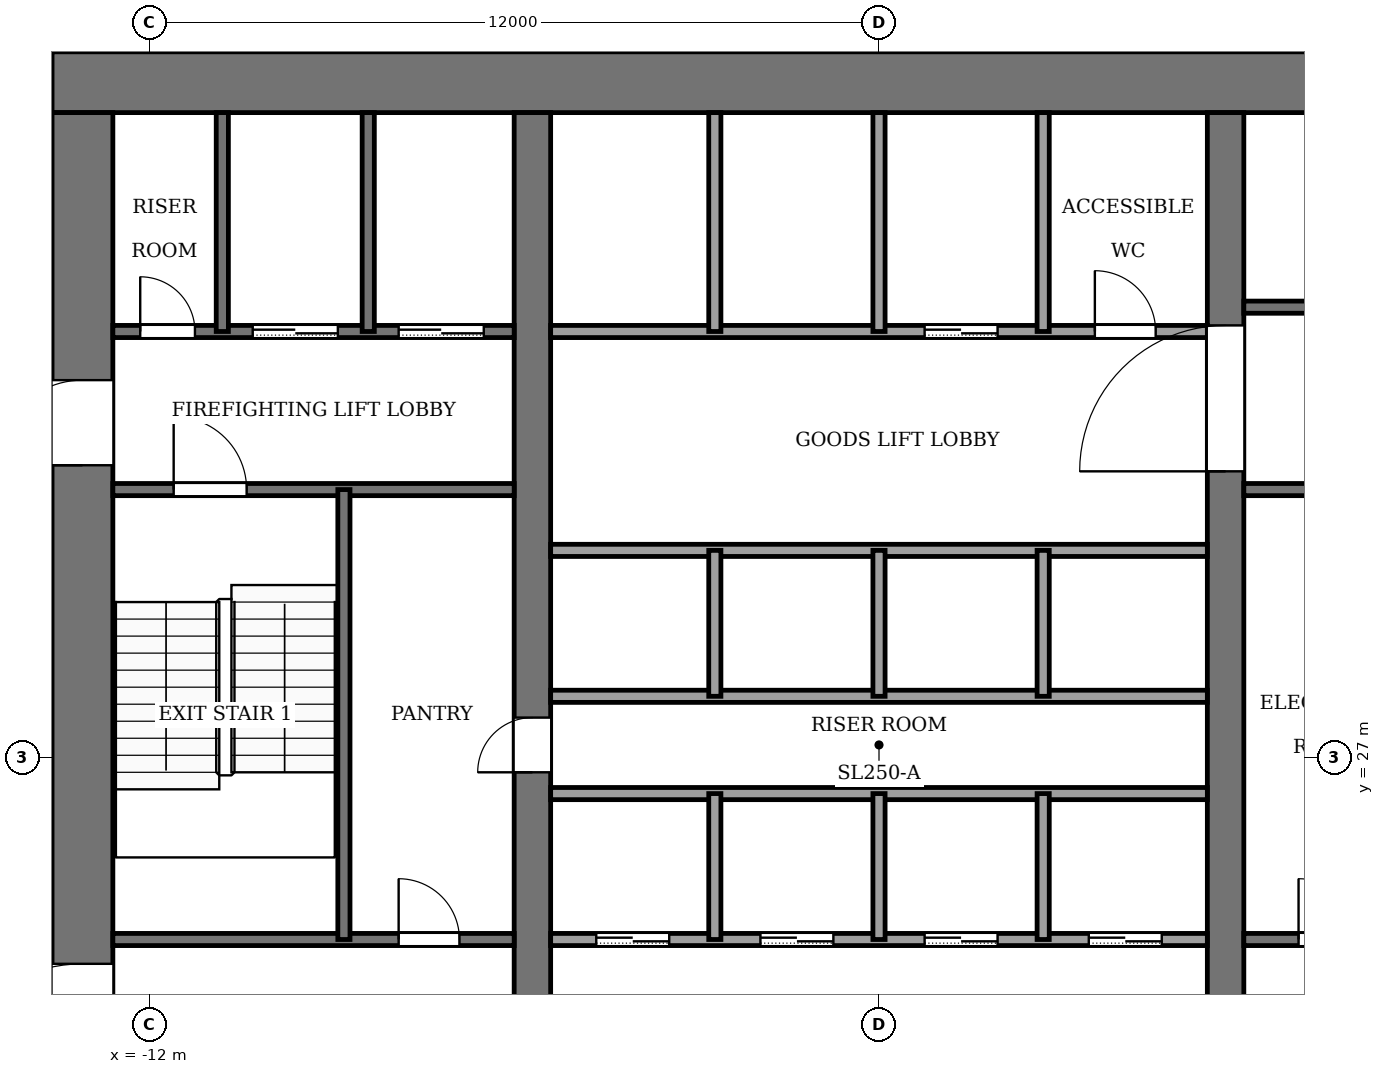
"""IFC4 building model, lengths in metres.
Left out: names, types, materials, properties, quantities, classifications, styles, units other than length and angle.
Written with IfcOpenShell. Run it as: python <this file> out.ifc"""

import sys

from ifc_helpers import new_model, si_unit, direction, frame, frame_2d, origin, place, context, subcontext, project, spatial, rectangle, extrude, element, fill, save


model = new_model("IFC4")
c1 = context("Model", 3, precision=1e-05, world=origin(), true_north=direction((0.0, 1.0)))
c2 = subcontext(c1, "Body", "Model", "MODEL_VIEW")
j1 = project(units=[si_unit("LENGTHUNIT", "METRE"), si_unit("PLANEANGLEUNIT", "RADIAN")], contexts=[c1])
p1 = place(None, origin())
s1 = spatial("IfcSite", under=j1, at=p1, CompositionType="ELEMENT")
p2 = place(p1, origin())
s2 = spatial("IfcBuilding", under=s1, at=p2, CompositionType="ELEMENT")
p3 = place(p2, frame((0.0, 0.0, 158.0)))
s3 = spatial("IfcBuildingStorey", under=s2, at=p3, CompositionType="ELEMENT", Elevation=158.0)
p4 = place(p3, frame((-13.6, 38.1, -0.13), z_axis=(0.0, 0.0, 1.0), x_axis=(1.0, 0.0, 0.0)))
e1 = element("IfcWall", 1, at=p4, inside=s3, PredefinedType="SHEAR", context=c2, shape_type="SweptSolid", body=[
    extrude(rectangle(XDim=27.2, YDim=1.0, at=frame_2d((13.6, 0.0))), origin(), (0.0, 0.0, 1.0), 4.0),
])
p5 = place(p3, frame((-13.1, 18.4, -0.13), z_axis=(0.0, 0.0, 1.0), x_axis=(0.0, 1.0, 0.0)))
e2 = element("IfcWall", 2, at=p5, inside=s3, PredefinedType="SHEAR", context=c2, shape_type="SweptSolid", body=[
    extrude(rectangle(XDim=19.2, YDim=1.0, at=frame_2d((9.6, 0.0))), origin(), (0.0, 0.0, 1.0), 4.0),
])
p6 = place(p5, frame((2.8, 0.0, 0.13)))
e3 = element("IfcOpeningElement", 3, at=p6, cuts=e2, PredefinedType="OPENING", context=c2, shape_type="SweptSolid", body=[
    extrude(rectangle(XDim=2.4, YDim=2.4, at=frame_2d((1.2, 1.2))), frame((0.0, 0.51, 0.0), z_axis=(0.0, -1.0, 0.0), x_axis=(1.0, 0.0, 0.0)), (0.0, 0.0, 1.0), 1.02),
])
p7 = place(p5, frame((13.4, 0.0, 0.13)))
e4 = element("IfcOpeningElement", 4, at=p7, cuts=e2, PredefinedType="OPENING", context=c2, shape_type="SweptSolid", body=[
    extrude(rectangle(XDim=1.4, YDim=2.2, at=frame_2d((0.7, 1.1))), frame((0.0, 0.51, 0.0), z_axis=(0.0, -1.0, 0.0), x_axis=(1.0, 0.0, 0.0)), (0.0, 0.0, 1.0), 1.02),
])
p8 = place(p3, frame((-5.7, 18.4, -0.13), z_axis=(0.0, 0.0, 1.0), x_axis=(0.0, 1.0, 0.0)))
e5 = element("IfcWall", 5, at=p8, inside=s3, PredefinedType="SHEAR", context=c2, shape_type="SweptSolid", body=[
    extrude(rectangle(XDim=19.2, YDim=0.6, at=frame_2d((9.6, 0.0))), origin(), (0.0, 0.0, 1.0), 4.0),
])
p9 = place(p8, frame((8.35, 0.0, 0.13)))
e6 = element("IfcOpeningElement", 6, at=p9, cuts=e5, PredefinedType="OPENING", context=c2, shape_type="SweptSolid", body=[
    extrude(rectangle(XDim=0.9, YDim=2.1, at=frame_2d((0.45, 1.05))), frame((0.0, 0.31, 0.0), z_axis=(0.0, -1.0, 0.0), x_axis=(1.0, 0.0, 0.0)), (0.0, 0.0, 1.0), 0.62),
])
p10 = place(p3, frame((5.7, 18.4, -0.13), z_axis=(0.0, 0.0, 1.0), x_axis=(0.0, 1.0, 0.0)))
e7 = element("IfcWall", 7, at=p10, inside=s3, PredefinedType="SHEAR", context=c2, shape_type="SweptSolid", body=[
    extrude(rectangle(XDim=19.2, YDim=0.6, at=frame_2d((9.6, 0.0))), origin(), (0.0, 0.0, 1.0), 4.0),
])
p11 = place(p10, frame((13.3, 0.0, 0.13)))
e8 = element("IfcOpeningElement", 8, at=p11, cuts=e7, PredefinedType="OPENING", context=c2, shape_type="SweptSolid", body=[
    extrude(rectangle(XDim=2.4, YDim=2.4, at=frame_2d((1.2, 1.2))), frame((0.0, 0.31, 0.0), z_axis=(0.0, -1.0, 0.0), x_axis=(1.0, 0.0, 0.0)), (0.0, 0.0, 1.0), 0.62),
])
p12 = place(p3, frame((-12.6, 24.0, 0.0), z_axis=(0.0, 0.0, 1.0), x_axis=(1.0, 0.0, 0.0)))
e9 = element("IfcWall", 9, at=p12, inside=s3, PredefinedType="PARTITIONING", context=c2, shape_type="SweptSolid", body=[
    extrude(rectangle(XDim=6.6, YDim=0.2, at=frame_2d((3.3, 0.0))), origin(), (0.0, 0.0, 1.0), 3.87),
])
p13 = place(p12, frame((4.7, 0.0, 0.0)))
e10 = element("IfcOpeningElement", 10, at=p13, cuts=e9, PredefinedType="OPENING", context=c2, shape_type="SweptSolid", body=[
    extrude(rectangle(XDim=1.0, YDim=2.1, at=frame_2d((0.5, 1.05))), frame((0.0, 0.11, 0.0), z_axis=(0.0, -1.0, 0.0), x_axis=(1.0, 0.0, 0.0)), (0.0, 0.0, 1.0), 0.22),
])
p14 = place(p3, frame((-5.4, 24.0, 0.0), z_axis=(0.0, 0.0, 1.0), x_axis=(1.0, 0.0, 0.0)))
e11 = element("IfcWall", 11, at=p14, inside=s3, PredefinedType="PARTITIONING", context=c2, shape_type="SweptSolid", body=[
    extrude(rectangle(XDim=10.8, YDim=0.2, at=frame_2d((5.4, 0.0))), origin(), (0.0, 0.0, 1.0), 3.87),
])
p15 = place(p14, frame((0.75, 0.0, 0.0)))
e12 = element("IfcOpeningElement", 12, at=p15, cuts=e11, PredefinedType="OPENING", context=c2, shape_type="SweptSolid", body=[
    extrude(rectangle(XDim=1.2, YDim=2.2, at=frame_2d((0.6, 1.1))), frame((0.0, 0.11, 0.0), z_axis=(0.0, -1.0, 0.0), x_axis=(1.0, 0.0, 0.0)), (0.0, 0.0, 1.0), 0.22),
])
p16 = place(p14, frame((3.45, 0.0, 0.0)))
e13 = element("IfcOpeningElement", 13, at=p16, cuts=e11, PredefinedType="OPENING", context=c2, shape_type="SweptSolid", body=[
    extrude(rectangle(XDim=1.2, YDim=2.2, at=frame_2d((0.6, 1.1))), frame((0.0, 0.11, 0.0), z_axis=(0.0, -1.0, 0.0), x_axis=(1.0, 0.0, 0.0)), (0.0, 0.0, 1.0), 0.22),
])
p17 = place(p14, frame((6.15, 0.0, 0.0)))
e14 = element("IfcOpeningElement", 14, at=p17, cuts=e11, PredefinedType="OPENING", context=c2, shape_type="SweptSolid", body=[
    extrude(rectangle(XDim=1.2, YDim=2.2, at=frame_2d((0.6, 1.1))), frame((0.0, 0.11, 0.0), z_axis=(0.0, -1.0, 0.0), x_axis=(1.0, 0.0, 0.0)), (0.0, 0.0, 1.0), 0.22),
])
p18 = place(p14, frame((8.85, 0.0, 0.0)))
e15 = element("IfcOpeningElement", 15, at=p18, cuts=e11, PredefinedType="OPENING", context=c2, shape_type="SweptSolid", body=[
    extrude(rectangle(XDim=1.2, YDim=2.2, at=frame_2d((0.6, 1.1))), frame((0.0, 0.11, 0.0), z_axis=(0.0, -1.0, 0.0), x_axis=(1.0, 0.0, 0.0)), (0.0, 0.0, 1.0), 0.22),
])
p19 = place(p3, frame((6.0, 24.0, 0.0), z_axis=(0.0, 0.0, 1.0), x_axis=(1.0, 0.0, 0.0)))
e16 = element("IfcWall", 16, at=p19, inside=s3, PredefinedType="PARTITIONING", context=c2, shape_type="SweptSolid", body=[
    extrude(rectangle(XDim=6.6, YDim=0.2, at=frame_2d((3.3, 0.0))), origin(), (0.0, 0.0, 1.0), 3.87),
])
p20 = place(p19, frame((0.9, 0.0, 0.0)))
e17 = element("IfcOpeningElement", 17, at=p20, cuts=e16, PredefinedType="OPENING", context=c2, shape_type="SweptSolid", body=[
    extrude(rectangle(XDim=1.0, YDim=2.1, at=frame_2d((0.5, 1.05))), frame((0.0, 0.11, 0.0), z_axis=(0.0, -1.0, 0.0), x_axis=(1.0, 0.0, 0.0)), (0.0, 0.0, 1.0), 0.22),
])
p21 = place(p19, frame((4.4, 0.0, 0.0)))
e18 = element("IfcOpeningElement", 18, at=p21, cuts=e16, PredefinedType="OPENING", context=c2, shape_type="SweptSolid", body=[
    extrude(rectangle(XDim=1.2, YDim=2.2, at=frame_2d((0.6, 1.1))), frame((0.0, 0.11, 0.0), z_axis=(0.0, -1.0, 0.0), x_axis=(1.0, 0.0, 0.0)), (0.0, 0.0, 1.0), 0.22),
])
for number, where, z_axis, x_axis in (
    (19, (-5.4, 26.4, 0.0), (0.0, 0.0, 1.0), (1.0, 0.0, 0.0)),
    (20, (-5.4, 28.0, 0.0), (0.0, 0.0, 1.0), (1.0, 0.0, 0.0)),
    (21, (-5.4, 30.4, 0.0), (0.0, 0.0, 1.0), (1.0, 0.0, 0.0)),
):
    element("IfcWall", number, at=place(p3, frame(where, z_axis=z_axis, x_axis=x_axis)), inside=s3, PredefinedType="PARTITIONING", context=c2, shape_type="SweptSolid", body=[
        extrude(rectangle(XDim=10.8, YDim=0.2, at=frame_2d((5.4, 0.0))), origin(), (0.0, 0.0, 1.0), 3.87),
    ])
p22 = place(p3, frame((-12.6, 31.4, 0.0), z_axis=(0.0, 0.0, 1.0), x_axis=(1.0, 0.0, 0.0)))
e22 = element("IfcWall", 22, at=p22, inside=s3, PredefinedType="PARTITIONING", context=c2, shape_type="SweptSolid", body=[
    extrude(rectangle(XDim=6.6, YDim=0.2, at=frame_2d((3.3, 0.0))), origin(), (0.0, 0.0, 1.0), 3.87),
])
p23 = place(p22, frame((1.0, 0.0, 0.0)))
e23 = element("IfcOpeningElement", 23, at=p23, cuts=e22, PredefinedType="OPENING", context=c2, shape_type="SweptSolid", body=[
    extrude(rectangle(XDim=1.2, YDim=2.2, at=frame_2d((0.6, 1.1))), frame((0.0, 0.11, 0.0), z_axis=(0.0, -1.0, 0.0), x_axis=(1.0, 0.0, 0.0)), (0.0, 0.0, 1.0), 0.22),
])
p24 = place(p3, frame((6.0, 31.4, 0.0), z_axis=(0.0, 0.0, 1.0), x_axis=(1.0, 0.0, 0.0)))
e24 = element("IfcWall", 24, at=p24, inside=s3, PredefinedType="PARTITIONING", context=c2, shape_type="SweptSolid", body=[
    extrude(rectangle(XDim=6.6, YDim=0.2, at=frame_2d((3.3, 0.0))), origin(), (0.0, 0.0, 1.0), 3.87),
])
p25 = place(p3, frame((-12.6, 34.0, 0.0), z_axis=(0.0, 0.0, 1.0), x_axis=(1.0, 0.0, 0.0)))
e25 = element("IfcWall", 25, at=p25, inside=s3, PredefinedType="PARTITIONING", context=c2, shape_type="SweptSolid", body=[
    extrude(rectangle(XDim=6.6, YDim=0.2, at=frame_2d((3.3, 0.0))), origin(), (0.0, 0.0, 1.0), 3.87),
])
p26 = place(p25, frame((4.7, 0.0, 0.0)))
e26 = element("IfcOpeningElement", 26, at=p26, cuts=e25, PredefinedType="OPENING", context=c2, shape_type="SweptSolid", body=[
    extrude(rectangle(XDim=1.4, YDim=2.2, at=frame_2d((0.7, 1.1))), frame((0.0, 0.11, 0.0), z_axis=(0.0, -1.0, 0.0), x_axis=(1.0, 0.0, 0.0)), (0.0, 0.0, 1.0), 0.22),
])
p27 = place(p25, frame((2.3, 0.0, 0.0)))
e27 = element("IfcOpeningElement", 27, at=p27, cuts=e25, PredefinedType="OPENING", context=c2, shape_type="SweptSolid", body=[
    extrude(rectangle(XDim=1.4, YDim=2.2, at=frame_2d((0.7, 1.1))), frame((0.0, 0.11, 0.0), z_axis=(0.0, -1.0, 0.0), x_axis=(1.0, 0.0, 0.0)), (0.0, 0.0, 1.0), 0.22),
])
p28 = place(p25, frame((0.45, 0.0, 0.0)))
e28 = element("IfcOpeningElement", 28, at=p28, cuts=e25, PredefinedType="OPENING", context=c2, shape_type="SweptSolid", body=[
    extrude(rectangle(XDim=0.9, YDim=2.1, at=frame_2d((0.45, 1.05))), frame((0.0, 0.11, 0.0), z_axis=(0.0, -1.0, 0.0), x_axis=(1.0, 0.0, 0.0)), (0.0, 0.0, 1.0), 0.22),
])
p29 = place(p3, frame((-5.4, 34.0, 0.0), z_axis=(0.0, 0.0, 1.0), x_axis=(1.0, 0.0, 0.0)))
e29 = element("IfcWall", 29, at=p29, inside=s3, PredefinedType="PARTITIONING", context=c2, shape_type="SweptSolid", body=[
    extrude(rectangle(XDim=10.8, YDim=0.2, at=frame_2d((5.4, 0.0))), origin(), (0.0, 0.0, 1.0), 3.87),
])
p30 = place(p29, frame((6.15, 0.0, 0.0)))
e30 = element("IfcOpeningElement", 30, at=p30, cuts=e29, PredefinedType="OPENING", context=c2, shape_type="SweptSolid", body=[
    extrude(rectangle(XDim=1.2, YDim=2.2, at=frame_2d((0.6, 1.1))), frame((0.0, 0.11, 0.0), z_axis=(0.0, -1.0, 0.0), x_axis=(1.0, 0.0, 0.0)), (0.0, 0.0, 1.0), 0.22),
])
p31 = place(p29, frame((8.95, 0.0, 0.0)))
e31 = element("IfcOpeningElement", 31, at=p31, cuts=e29, PredefinedType="OPENING", context=c2, shape_type="SweptSolid", body=[
    extrude(rectangle(XDim=1.0, YDim=2.1, at=frame_2d((0.5, 1.05))), frame((0.0, 0.11, 0.0), z_axis=(0.0, -1.0, 0.0), x_axis=(1.0, 0.0, 0.0)), (0.0, 0.0, 1.0), 0.22),
])
p32 = place(p3, frame((6.0, 34.4, 0.0), z_axis=(0.0, 0.0, 1.0), x_axis=(1.0, 0.0, 0.0)))
e32 = element("IfcWall", 32, at=p32, inside=s3, PredefinedType="PARTITIONING", context=c2, shape_type="SweptSolid", body=[
    extrude(rectangle(XDim=6.6, YDim=0.2, at=frame_2d((3.3, 0.0))), origin(), (0.0, 0.0, 1.0), 3.87),
])
p33 = place(p32, frame((4.8, 0.0, 0.0)))
e33 = element("IfcOpeningElement", 33, at=p33, cuts=e32, PredefinedType="OPENING", context=c2, shape_type="SweptSolid", body=[
    extrude(rectangle(XDim=1.2, YDim=2.2, at=frame_2d((0.6, 1.1))), frame((0.0, 0.11, 0.0), z_axis=(0.0, -1.0, 0.0), x_axis=(1.0, 0.0, 0.0)), (0.0, 0.0, 1.0), 0.22),
])
p34 = place(p3, frame((-10.8, 34.0, 0.0), z_axis=(0.0, 0.0, 1.0), x_axis=(0.0, 1.0, 0.0)))
e34 = element("IfcWall", 34, at=p34, inside=s3, PredefinedType="PARTITIONING", context=c2, shape_type="SweptSolid", body=[
    extrude(rectangle(XDim=3.6, YDim=0.2, at=frame_2d((1.8, 0.0))), origin(), (0.0, 0.0, 1.0), 3.87),
])
p35 = place(p3, frame((-8.8, 24.0, 0.0), z_axis=(0.0, 0.0, 1.0), x_axis=(0.0, 1.0, 0.0)))
e35 = element("IfcWall", 35, at=p35, inside=s3, PredefinedType="PARTITIONING", context=c2, shape_type="SweptSolid", body=[
    extrude(rectangle(XDim=7.4, YDim=0.2, at=frame_2d((3.7, 0.0))), origin(), (0.0, 0.0, 1.0), 3.87),
])
p36 = place(p3, frame((-8.4, 34.0, 0.0), z_axis=(0.0, 0.0, 1.0), x_axis=(0.0, 1.0, 0.0)))
e36 = element("IfcWall", 36, at=p36, inside=s3, PredefinedType="PARTITIONING", context=c2, shape_type="SweptSolid", body=[
    extrude(rectangle(XDim=3.6, YDim=0.2, at=frame_2d((1.8, 0.0))), origin(), (0.0, 0.0, 1.0), 3.87),
])
for number, where, z_axis, x_axis in (
    (37, (-2.7, 24.0, 0.0), (0.0, 0.0, 1.0), (0.0, 1.0, 0.0)),
    (38, (-2.7, 28.0, 0.0), (0.0, 0.0, 1.0), (0.0, 1.0, 0.0)),
):
    element("IfcWall", number, at=place(p3, frame(where, z_axis=z_axis, x_axis=x_axis)), inside=s3, PredefinedType="PARTITIONING", context=c2, shape_type="SweptSolid", body=[
        extrude(rectangle(XDim=2.4, YDim=0.2, at=frame_2d((1.2, 0.0))), origin(), (0.0, 0.0, 1.0), 3.87),
    ])
p37 = place(p3, frame((-2.7, 34.0, 0.0), z_axis=(0.0, 0.0, 1.0), x_axis=(0.0, 1.0, 0.0)))
e39 = element("IfcWall", 39, at=p37, inside=s3, PredefinedType="PARTITIONING", context=c2, shape_type="SweptSolid", body=[
    extrude(rectangle(XDim=3.6, YDim=0.2, at=frame_2d((1.8, 0.0))), origin(), (0.0, 0.0, 1.0), 3.87),
])
for number, where, z_axis, x_axis in (
    (40, (0.0, 24.0, 0.0), (0.0, 0.0, 1.0), (0.0, 1.0, 0.0)),
    (41, (0.0, 28.0, 0.0), (0.0, 0.0, 1.0), (0.0, 1.0, 0.0)),
):
    element("IfcWall", number, at=place(p3, frame(where, z_axis=z_axis, x_axis=x_axis)), inside=s3, PredefinedType="PARTITIONING", context=c2, shape_type="SweptSolid", body=[
        extrude(rectangle(XDim=2.4, YDim=0.2, at=frame_2d((1.2, 0.0))), origin(), (0.0, 0.0, 1.0), 3.87),
    ])
p38 = place(p3, frame((0.0, 34.0, 0.0), z_axis=(0.0, 0.0, 1.0), x_axis=(0.0, 1.0, 0.0)))
e42 = element("IfcWall", 42, at=p38, inside=s3, PredefinedType="PARTITIONING", context=c2, shape_type="SweptSolid", body=[
    extrude(rectangle(XDim=3.6, YDim=0.2, at=frame_2d((1.8, 0.0))), origin(), (0.0, 0.0, 1.0), 3.87),
])
for number, where, z_axis, x_axis in (
    (43, (2.7, 24.0, 0.0), (0.0, 0.0, 1.0), (0.0, 1.0, 0.0)),
    (44, (2.7, 28.0, 0.0), (0.0, 0.0, 1.0), (0.0, 1.0, 0.0)),
):
    element("IfcWall", number, at=place(p3, frame(where, z_axis=z_axis, x_axis=x_axis)), inside=s3, PredefinedType="PARTITIONING", context=c2, shape_type="SweptSolid", body=[
        extrude(rectangle(XDim=2.4, YDim=0.2, at=frame_2d((1.2, 0.0))), origin(), (0.0, 0.0, 1.0), 3.87),
    ])
p39 = place(p3, frame((2.7, 34.0, 0.0), z_axis=(0.0, 0.0, 1.0), x_axis=(0.0, 1.0, 0.0)))
e45 = element("IfcWall", 45, at=p39, inside=s3, PredefinedType="PARTITIONING", context=c2, shape_type="SweptSolid", body=[
    extrude(rectangle(XDim=3.6, YDim=0.2, at=frame_2d((1.8, 0.0))), origin(), (0.0, 0.0, 1.0), 3.87),
])
p40 = place(p15, origin())
e46 = element("IfcDoor", 46, at=p40, inside=s3, OperationType="SLIDING_TO_LEFT", PredefinedType="DOOR", context=c2, shape_type="SweptSolid", body=[
    extrude(rectangle(XDim=1.2, YDim=2.2, at=frame_2d((0.6, 1.1))), frame((0.0, 0.025, 0.0), z_axis=(0.0, -1.0, 0.0), x_axis=(1.0, 0.0, 0.0)), (0.0, 0.0, 1.0), 0.05),
])
fill(e12, e46)
p41 = place(p16, origin())
e47 = element("IfcDoor", 47, at=p41, inside=s3, OperationType="SLIDING_TO_LEFT", PredefinedType="DOOR", context=c2, shape_type="SweptSolid", body=[
    extrude(rectangle(XDim=1.2, YDim=2.2, at=frame_2d((0.6, 1.1))), frame((0.0, 0.025, 0.0), z_axis=(0.0, -1.0, 0.0), x_axis=(1.0, 0.0, 0.0)), (0.0, 0.0, 1.0), 0.05),
])
fill(e13, e47)
p42 = place(p17, origin())
e48 = element("IfcDoor", 48, at=p42, inside=s3, OperationType="SLIDING_TO_LEFT", PredefinedType="DOOR", context=c2, shape_type="SweptSolid", body=[
    extrude(rectangle(XDim=1.2, YDim=2.2, at=frame_2d((0.6, 1.1))), frame((0.0, 0.025, 0.0), z_axis=(0.0, -1.0, 0.0), x_axis=(1.0, 0.0, 0.0)), (0.0, 0.0, 1.0), 0.05),
])
fill(e14, e48)
p43 = place(p18, origin())
e49 = element("IfcDoor", 49, at=p43, inside=s3, OperationType="SLIDING_TO_LEFT", PredefinedType="DOOR", context=c2, shape_type="SweptSolid", body=[
    extrude(rectangle(XDim=1.2, YDim=2.2, at=frame_2d((0.6, 1.1))), frame((0.0, 0.025, 0.0), z_axis=(0.0, -1.0, 0.0), x_axis=(1.0, 0.0, 0.0)), (0.0, 0.0, 1.0), 0.05),
])
fill(e15, e49)
p44 = place(p30, origin())
e50 = element("IfcDoor", 50, at=p44, inside=s3, OperationType="SLIDING_TO_LEFT", PredefinedType="DOOR", context=c2, shape_type="SweptSolid", body=[
    extrude(rectangle(XDim=1.2, YDim=2.2, at=frame_2d((0.6, 1.1))), frame((0.0, 0.025, 0.0), z_axis=(0.0, -1.0, 0.0), x_axis=(1.0, 0.0, 0.0)), (0.0, 0.0, 1.0), 0.05),
])
fill(e30, e50)
p45 = place(p26, origin())
e51 = element("IfcDoor", 51, at=p45, inside=s3, OperationType="SLIDING_TO_LEFT", PredefinedType="DOOR", context=c2, shape_type="SweptSolid", body=[
    extrude(rectangle(XDim=1.4, YDim=2.2, at=frame_2d((0.7, 1.1))), frame((0.0, 0.025, 0.0), z_axis=(0.0, -1.0, 0.0), x_axis=(1.0, 0.0, 0.0)), (0.0, 0.0, 1.0), 0.05),
])
fill(e26, e51)
p46 = place(p27, origin())
e52 = element("IfcDoor", 52, at=p46, inside=s3, OperationType="SLIDING_TO_LEFT", PredefinedType="DOOR", context=c2, shape_type="SweptSolid", body=[
    extrude(rectangle(XDim=1.4, YDim=2.2, at=frame_2d((0.7, 1.1))), frame((0.0, 0.025, 0.0), z_axis=(0.0, -1.0, 0.0), x_axis=(1.0, 0.0, 0.0)), (0.0, 0.0, 1.0), 0.05),
])
fill(e27, e52)
p47 = place(p28, origin())
e53 = element("IfcDoor", 53, at=p47, inside=s3, OperationType="SINGLE_SWING_RIGHT", PredefinedType="DOOR", context=c2, shape_type="SweptSolid", body=[
    extrude(rectangle(XDim=0.9, YDim=2.1, at=frame_2d((0.45, 1.05))), frame((0.0, 0.025, 0.0), z_axis=(0.0, -1.0, 0.0), x_axis=(1.0, 0.0, 0.0)), (0.0, 0.0, 1.0), 0.05),
])
fill(e28, e53)
p48 = place(p13, origin())
e54 = element("IfcDoor", 54, at=p48, inside=s3, OperationType="SINGLE_SWING_RIGHT", PredefinedType="DOOR", context=c2, shape_type="SweptSolid", body=[
    extrude(rectangle(XDim=1.0, YDim=2.1, at=frame_2d((0.5, 1.05))), frame((0.0, 0.025, 0.0), z_axis=(0.0, -1.0, 0.0), x_axis=(1.0, 0.0, 0.0)), (0.0, 0.0, 1.0), 0.05),
])
fill(e10, e54)
p49 = place(p20, origin())
e55 = element("IfcDoor", 55, at=p49, inside=s3, OperationType="SINGLE_SWING_LEFT", PredefinedType="DOOR", context=c2, shape_type="SweptSolid", body=[
    extrude(rectangle(XDim=1.0, YDim=2.1, at=frame_2d((0.5, 1.05))), frame((0.0, 0.025, 0.0), z_axis=(0.0, -1.0, 0.0), x_axis=(1.0, 0.0, 0.0)), (0.0, 0.0, 1.0), 0.05),
])
fill(e17, e55)
p50 = place(p31, origin())
e56 = element("IfcDoor", 56, at=p50, inside=s3, OperationType="SINGLE_SWING_LEFT", PredefinedType="DOOR", context=c2, shape_type="SweptSolid", body=[
    extrude(rectangle(XDim=1.0, YDim=2.1, at=frame_2d((0.5, 1.05))), frame((0.0, 0.025, 0.0), z_axis=(0.0, -1.0, 0.0), x_axis=(1.0, 0.0, 0.0)), (0.0, 0.0, 1.0), 0.05),
])
fill(e31, e56)
p51 = place(p9, origin())
e57 = element("IfcDoor", 57, at=p51, inside=s3, OperationType="SINGLE_SWING_RIGHT", PredefinedType="DOOR", context=c2, shape_type="SweptSolid", body=[
    extrude(rectangle(XDim=0.9, YDim=2.1, at=frame_2d((0.45, 1.05))), frame((0.0, 0.025, 0.0), z_axis=(0.0, -1.0, 0.0), x_axis=(1.0, 0.0, 0.0)), (0.0, 0.0, 1.0), 0.05),
])
fill(e6, e57)
p52 = place(p23, origin())
e58 = element("IfcDoor", 58, at=p52, inside=s3, OperationType="SINGLE_SWING_RIGHT", PredefinedType="DOOR", context=c2, shape_type="SweptSolid", body=[
    extrude(rectangle(XDim=1.2, YDim=2.2, at=frame_2d((0.6, 1.1))), frame((0.0, 0.025, 0.0), z_axis=(0.0, -1.0, 0.0), x_axis=(1.0, 0.0, 0.0)), (0.0, 0.0, 1.0), 0.05),
])
fill(e23, e58)
p53 = place(p11, origin())
e59 = element("IfcDoor", 59, at=p53, inside=s3, OperationType="DOUBLE_DOOR_SINGLE_SWING", PredefinedType="DOOR", context=c2, shape_type="SweptSolid", body=[
    extrude(rectangle(XDim=2.4, YDim=2.4, at=frame_2d((1.2, 1.2))), frame((0.0, 0.025, 0.0), z_axis=(0.0, -1.0, 0.0), x_axis=(1.0, 0.0, 0.0)), (0.0, 0.0, 1.0), 0.05),
])
fill(e8, e59)
p54 = place(p6, origin())
e60 = element("IfcDoor", 60, at=p54, inside=s3, OperationType="DOUBLE_DOOR_SINGLE_SWING", PredefinedType="DOOR", context=c2, shape_type="SweptSolid", body=[
    extrude(rectangle(XDim=2.4, YDim=2.4, at=frame_2d((1.2, 1.2))), frame((0.0, 0.025, 0.0), z_axis=(0.0, -1.0, 0.0), x_axis=(1.0, 0.0, 0.0)), (0.0, 0.0, 1.0), 0.05),
])
fill(e3, e60)
p55 = place(p7, origin())
e61 = element("IfcDoor", 61, at=p55, inside=s3, OperationType="SINGLE_SWING_RIGHT", PredefinedType="DOOR", context=c2, shape_type="SweptSolid", body=[
    extrude(rectangle(XDim=1.4, YDim=2.2, at=frame_2d((0.7, 1.1))), frame((0.0, 0.025, 0.0), z_axis=(0.0, -1.0, 0.0), x_axis=(1.0, 0.0, 0.0)), (0.0, 0.0, 1.0), 0.05),
])
fill(e4, e61)
save(model, sys.argv[1])
